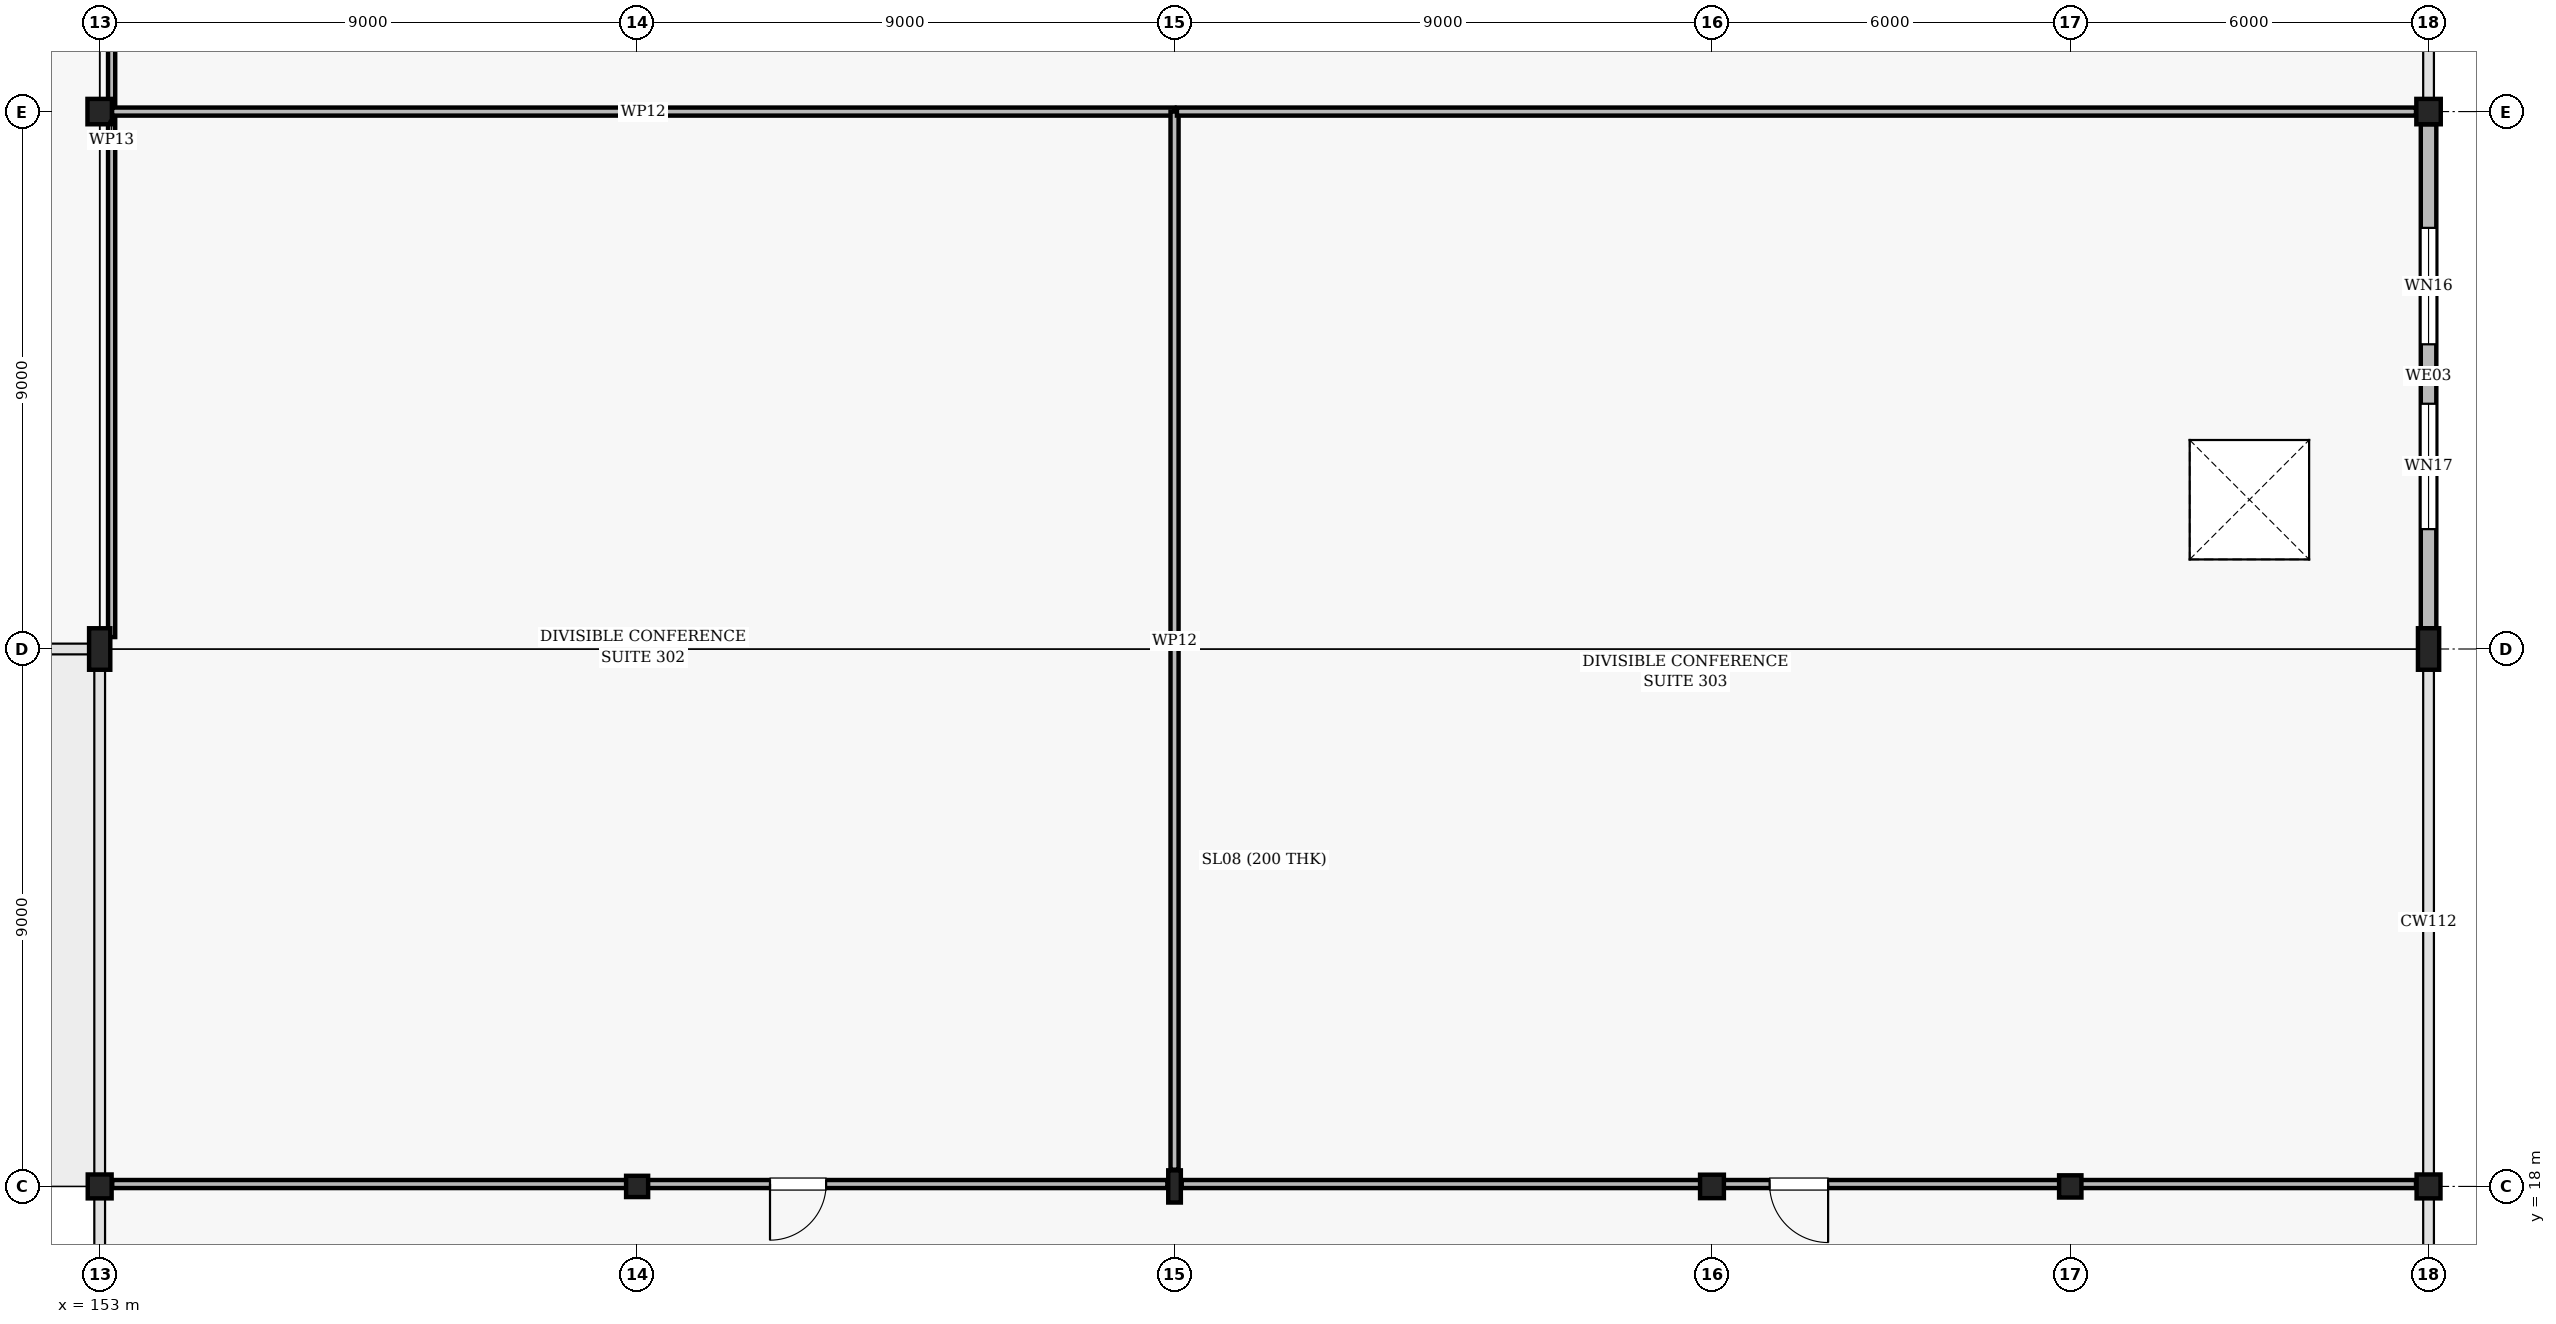
"""IFC4 building model, lengths in metres.
Left out: names, types, materials, properties, quantities, classifications, styles, units other than length and angle.
Written with IfcOpenShell. Run it as: python <this file> out.ifc"""

import sys

from ifc_helpers import new_model, si_unit, direction, frame, frame_2d, origin, origin_2d, place, context, subcontext, project, spatial, rectangle, hollow_rectangle, i_section, extrude, element, fill, save


model = new_model("IFC4")
c1 = context("Model", 3, precision=1e-05, world=origin(), true_north=direction((0.0, 1.0)))
c2 = subcontext(c1, "Body", "Model", "MODEL_VIEW")
j1 = project(units=[si_unit("LENGTHUNIT", "METRE"), si_unit("PLANEANGLEUNIT", "RADIAN")], contexts=[c1])
p1 = place(None, origin())
s1 = spatial("IfcSite", under=j1, at=p1, CompositionType="ELEMENT")
p2 = place(p1, origin())
s2 = spatial("IfcBuilding", under=s1, at=p2, CompositionType="ELEMENT")
p3 = place(p2, frame((0.0, 0.0, 15.6)))
s3 = spatial("IfcBuildingStorey", under=s2, at=p3, CompositionType="ELEMENT", Elevation=15.6)
p4 = place(p3, frame((153.0, 18.0, 0.0), z_axis=(0.0, 0.0, 1.0), x_axis=(1.0, 0.0, 0.0)))
e1 = element("IfcColumn", 1, at=p4, inside=s3, PredefinedType="COLUMN", context=c2, shape_type="SweptSolid", body=[
    extrude(hollow_rectangle(XDim=0.4, YDim=0.4, WallThickness=0.016, InnerFilletRadius=0.016, OuterFilletRadius=0.032, at=origin_2d()), origin(), (0.0, 0.0, 1.0), 4.8),
])
p5 = place(p3, frame((153.0, 27.0, 0.0), z_axis=(0.0, 0.0, 1.0), x_axis=(1.0, 0.0, 0.0)))
e2 = element("IfcColumn", 2, at=p5, inside=s3, PredefinedType="COLUMN", context=c2, shape_type="SweptSolid", body=[
    extrude(i_section(OverallWidth=0.355, OverallDepth=0.695, WebThickness=0.015, FlangeThickness=0.025, FilletRadius=0.018, at=origin_2d()), origin(), (0.0, 0.0, 1.0), 4.8),
])
p6 = place(p3, frame((153.0, 36.0, 0.0), z_axis=(0.0, 0.0, 1.0), x_axis=(1.0, 0.0, 0.0)))
e3 = element("IfcColumn", 3, at=p6, inside=s3, PredefinedType="COLUMN", context=c2, shape_type="SweptSolid", body=[
    extrude(i_section(OverallWidth=0.409, OverallDepth=0.425, WebThickness=0.031, FlangeThickness=0.049, FilletRadius=0.02, at=origin_2d()), origin(), (0.0, 0.0, 1.0), 4.8),
])
p7 = place(p3, frame((162.0, 18.0, 0.0), z_axis=(0.0, 0.0, 1.0), x_axis=(1.0, 0.0, 0.0)))
e4 = element("IfcColumn", 4, at=p7, inside=s3, PredefinedType="COLUMN", context=c2, shape_type="SweptSolid", body=[
    extrude(i_section(OverallWidth=0.369, OverallDepth=0.356, WebThickness=0.011, FlangeThickness=0.018, FilletRadius=0.015, at=origin_2d()), origin(), (0.0, 0.0, 1.0), 4.8),
])
p8 = place(p3, frame((171.0, 18.0, 0.0), z_axis=(0.0, 0.0, 1.0), x_axis=(1.0, 0.0, 0.0)))
e5 = element("IfcColumn", 5, at=p8, inside=s3, PredefinedType="COLUMN", context=c2, shape_type="SweptSolid", body=[
    extrude(i_section(OverallWidth=0.211, OverallDepth=0.539, WebThickness=0.012, FlangeThickness=0.019, FilletRadius=0.014, at=origin_2d()), origin(), (0.0, 0.0, 1.0), 4.8),
])
p9 = place(p3, frame((180.0, 18.0, 0.0), z_axis=(0.0, 0.0, 1.0), x_axis=(1.0, 0.0, 0.0)))
e6 = element("IfcColumn", 6, at=p9, inside=s3, PredefinedType="COLUMN", context=c2, shape_type="SweptSolid", body=[
    extrude(i_section(OverallWidth=0.399, OverallDepth=0.393, WebThickness=0.023, FlangeThickness=0.037, FilletRadius=0.018, at=origin_2d()), origin(), (0.0, 0.0, 1.0), 4.8),
])
p10 = place(p3, frame((186.0, 18.0, 0.0), z_axis=(0.0, 0.0, 1.0), x_axis=(1.0, 0.0, 0.0)))
e7 = element("IfcColumn", 7, at=p10, inside=s3, PredefinedType="COLUMN", context=c2, shape_type="SweptSolid", body=[
    extrude(i_section(OverallWidth=0.374, OverallDepth=0.372, WebThickness=0.016, FlangeThickness=0.026, FilletRadius=0.016, at=origin_2d()), origin(), (0.0, 0.0, 1.0), 4.8),
])
p11 = place(p3, frame((192.0, 18.0, 0.0), z_axis=(0.0, 0.0, 1.0), x_axis=(1.0, 0.0, 0.0)))
e8 = element("IfcColumn", 8, at=p11, inside=s3, PredefinedType="COLUMN", context=c2, shape_type="SweptSolid", body=[
    extrude(hollow_rectangle(XDim=0.4, YDim=0.4, WallThickness=0.016, InnerFilletRadius=0.016, OuterFilletRadius=0.032, at=origin_2d()), origin(), (0.0, 0.0, 1.0), 4.8),
])
p12 = place(p3, frame((192.0, 27.0, 0.0), z_axis=(0.0, 0.0, 1.0), x_axis=(1.0, 0.0, 0.0)))
e9 = element("IfcColumn", 9, at=p12, inside=s3, PredefinedType="COLUMN", context=c2, shape_type="SweptSolid", body=[
    extrude(i_section(OverallWidth=0.355, OverallDepth=0.695, WebThickness=0.015, FlangeThickness=0.025, FilletRadius=0.018, at=origin_2d()), origin(), (0.0, 0.0, 1.0), 4.8),
])
p13 = place(p3, frame((192.0, 36.0, 0.0), z_axis=(0.0, 0.0, 1.0), x_axis=(1.0, 0.0, 0.0)))
e10 = element("IfcColumn", 10, at=p13, inside=s3, PredefinedType="COLUMN", context=c2, shape_type="SweptSolid", body=[
    extrude(i_section(OverallWidth=0.409, OverallDepth=0.425, WebThickness=0.031, FlangeThickness=0.049, FilletRadius=0.02, at=origin_2d()), origin(), (0.0, 0.0, 1.0), 4.8),
])
p14 = place(p3, frame((192.0, 35.788, 0.0), z_axis=(0.0, 0.0, 1.0), x_axis=(0.0, -1.0, 0.0)))
e11 = element("IfcWall", 11, at=p14, inside=s3, PredefinedType="SOLIDWALL", context=c2, shape_type="SweptSolid", body=[
    extrude(rectangle(XDim=8.44, YDim=0.26, at=frame_2d((4.22, 0.0))), origin(), (0.0, 0.0, 1.0), 4.046),
])
p15 = place(p14, frame((1.735, 0.0, 0.95)))
e12 = element("IfcOpeningElement", 12, at=p15, cuts=e11, PredefinedType="OPENING", context=c2, shape_type="SweptSolid", body=[
    extrude(rectangle(XDim=1.95, YDim=2.1, at=frame_2d((0.975, 1.05))), frame((0.0, 0.14, 0.0), z_axis=(0.0, -1.0, 0.0), x_axis=(1.0, 0.0, 0.0)), (0.0, 0.0, 1.0), 0.28),
])
p16 = place(p14, frame((4.68, 0.0, 0.95)))
e13 = element("IfcOpeningElement", 13, at=p16, cuts=e11, PredefinedType="OPENING", context=c2, shape_type="SweptSolid", body=[
    extrude(rectangle(XDim=2.1, YDim=2.15, at=frame_2d((1.05, 1.075))), frame((0.0, 0.14, 0.0), z_axis=(0.0, -1.0, 0.0), x_axis=(1.0, 0.0, 0.0)), (0.0, 0.0, 1.0), 0.28),
])
p17 = place(p3, frame((153.2, 44.44, 0.0), z_axis=(0.0, 0.0, 1.0), x_axis=(0.0, -1.0, 0.0)))
e14 = element("IfcWall", 14, at=p17, inside=s3, PredefinedType="PARTITIONING", context=c2, shape_type="SweptSolid", body=[
    extrude(rectangle(XDim=17.24, YDim=0.12, at=frame_2d((8.62, 0.0))), origin(), (0.0, 0.0, 1.0), 3.673),
])
p18 = place(p17, frame((5.554, 0.0, 0.0)))
e15 = element("IfcOpeningElement", 15, at=p18, cuts=e14, PredefinedType="OPENING", context=c2, shape_type="SweptSolid", body=[
    extrude(rectangle(XDim=0.96, YDim=2.15, at=frame_2d((0.48, 1.075))), frame((0.0, 0.07, 0.0), z_axis=(0.0, -1.0, 0.0), x_axis=(1.0, 0.0, 0.0)), (0.0, 0.0, 1.0), 0.14),
])
p19 = place(p3, frame((153.207, 36.0, 0.0), z_axis=(0.0, 0.0, 1.0), x_axis=(1.0, 0.0, 0.0)))
e16 = element("IfcWall", 16, at=p19, inside=s3, PredefinedType="PARTITIONING", context=c2, shape_type="SweptSolid", body=[
    extrude(rectangle(XDim=17.793, YDim=0.135, at=frame_2d((8.897, 0.0))), origin(), (0.0, 0.0, 1.0), 3.673),
])
p20 = place(p3, frame((171.0, 36.0, 0.0), z_axis=(0.0, 0.0, 1.0), x_axis=(0.0, -1.0, 0.0)))
e17 = element("IfcWall", 17, at=p20, inside=s3, PredefinedType="PARTITIONING", context=c2, shape_type="SweptSolid", body=[
    extrude(rectangle(XDim=17.72, YDim=0.135, at=frame_2d((8.86, 0.0))), origin(), (0.0, 0.0, 1.0), 3.673),
])
p21 = place(p3, frame((170.88, 18.04, 0.0), z_axis=(0.0, 0.0, 1.0), x_axis=(-1.0, 0.0, 0.0)))
e18 = element("IfcWall", 18, at=p21, inside=s3, PredefinedType="PARTITIONING", context=c2, shape_type="SweptSolid", body=[
    extrude(rectangle(XDim=17.67, YDim=0.135, at=frame_2d((8.835, 0.0))), origin(), (0.0, 0.0, 1.0), 3.73),
])
p22 = place(p21, frame((5.715, 0.0, 0.0)))
e19 = element("IfcOpeningElement", 19, at=p22, cuts=e18, PredefinedType="OPENING", context=c2, shape_type="SweptSolid", body=[
    extrude(rectangle(XDim=0.94, YDim=2.15, at=frame_2d((0.47, 1.075))), frame((0.0, 0.078, 0.0), z_axis=(0.0, -1.0, 0.0), x_axis=(1.0, 0.0, 0.0)), (0.0, 0.0, 1.0), 0.155),
])
p23 = place(p3, frame((191.79, 18.04, 0.0), z_axis=(0.0, 0.0, 1.0), x_axis=(-1.0, 0.0, 0.0)))
e20 = element("IfcWall", 20, at=p23, inside=s3, PredefinedType="PARTITIONING", context=c2, shape_type="SweptSolid", body=[
    extrude(rectangle(XDim=20.67, YDim=0.135, at=frame_2d((10.335, 0.0))), origin(), (0.0, 0.0, 1.0), 3.73),
])
p24 = place(p23, frame((9.845, 0.0, 0.0)))
e21 = element("IfcOpeningElement", 21, at=p24, cuts=e20, PredefinedType="OPENING", context=c2, shape_type="SweptSolid", body=[
    extrude(rectangle(XDim=0.98, YDim=2.15, at=frame_2d((0.49, 1.075))), frame((0.0, 0.078, 0.0), z_axis=(0.0, -1.0, 0.0), x_axis=(1.0, 0.0, 0.0)), (0.0, 0.0, 1.0), 0.155),
])
p25 = place(p3, frame((171.04, 36.0, 0.0), z_axis=(0.0, 0.0, 1.0), x_axis=(1.0, 0.0, 0.0)))
e22 = element("IfcWall", 22, at=p25, inside=s3, PredefinedType="PARTITIONING", context=c2, shape_type="SweptSolid", body=[
    extrude(rectangle(XDim=20.75, YDim=0.135, at=frame_2d((10.375, 0.0))), origin(), (0.0, 0.0, 1.0), 3.673),
])
p26 = place(p15, origin())
e23 = element("IfcWindow", 23, at=p26, inside=s3, PartitioningType="SINGLE_PANEL", PredefinedType="WINDOW", context=c2, shape_type="SweptSolid", body=[
    extrude(rectangle(XDim=1.95, YDim=2.1, at=frame_2d((0.975, 1.05))), frame((0.0, 0.03, 0.0), z_axis=(0.0, -1.0, 0.0), x_axis=(1.0, 0.0, 0.0)), (0.0, 0.0, 1.0), 0.06),
])
fill(e12, e23)
p27 = place(p16, origin())
e24 = element("IfcWindow", 24, at=p27, inside=s3, PartitioningType="SINGLE_PANEL", PredefinedType="WINDOW", context=c2, shape_type="SweptSolid", body=[
    extrude(rectangle(XDim=2.1, YDim=2.15, at=frame_2d((1.05, 1.075))), frame((0.0, 0.03, 0.0), z_axis=(0.0, -1.0, 0.0), x_axis=(1.0, 0.0, 0.0)), (0.0, 0.0, 1.0), 0.06),
])
fill(e13, e24)
p28 = place(p22, origin())
e25 = element("IfcDoor", 25, at=p28, inside=s3, OperationType="SINGLE_SWING_RIGHT", PredefinedType="DOOR", context=c2, shape_type="SweptSolid", body=[
    extrude(rectangle(XDim=0.94, YDim=2.15, at=frame_2d((0.47, 1.075))), frame((0.0, 0.025, 0.0), z_axis=(0.0, -1.0, 0.0), x_axis=(1.0, 0.0, 0.0)), (0.0, 0.0, 1.0), 0.05),
])
fill(e19, e25)
p29 = place(p24, origin())
e26 = element("IfcDoor", 26, at=p29, inside=s3, OperationType="SINGLE_SWING_LEFT", PredefinedType="DOOR", context=c2, shape_type="SweptSolid", body=[
    extrude(rectangle(XDim=0.98, YDim=2.15, at=frame_2d((0.49, 1.075))), frame((0.0, 0.025, 0.0), z_axis=(0.0, -1.0, 0.0), x_axis=(1.0, 0.0, 0.0)), (0.0, 0.0, 1.0), 0.05),
])
fill(e21, e26)
save(model, sys.argv[1])
